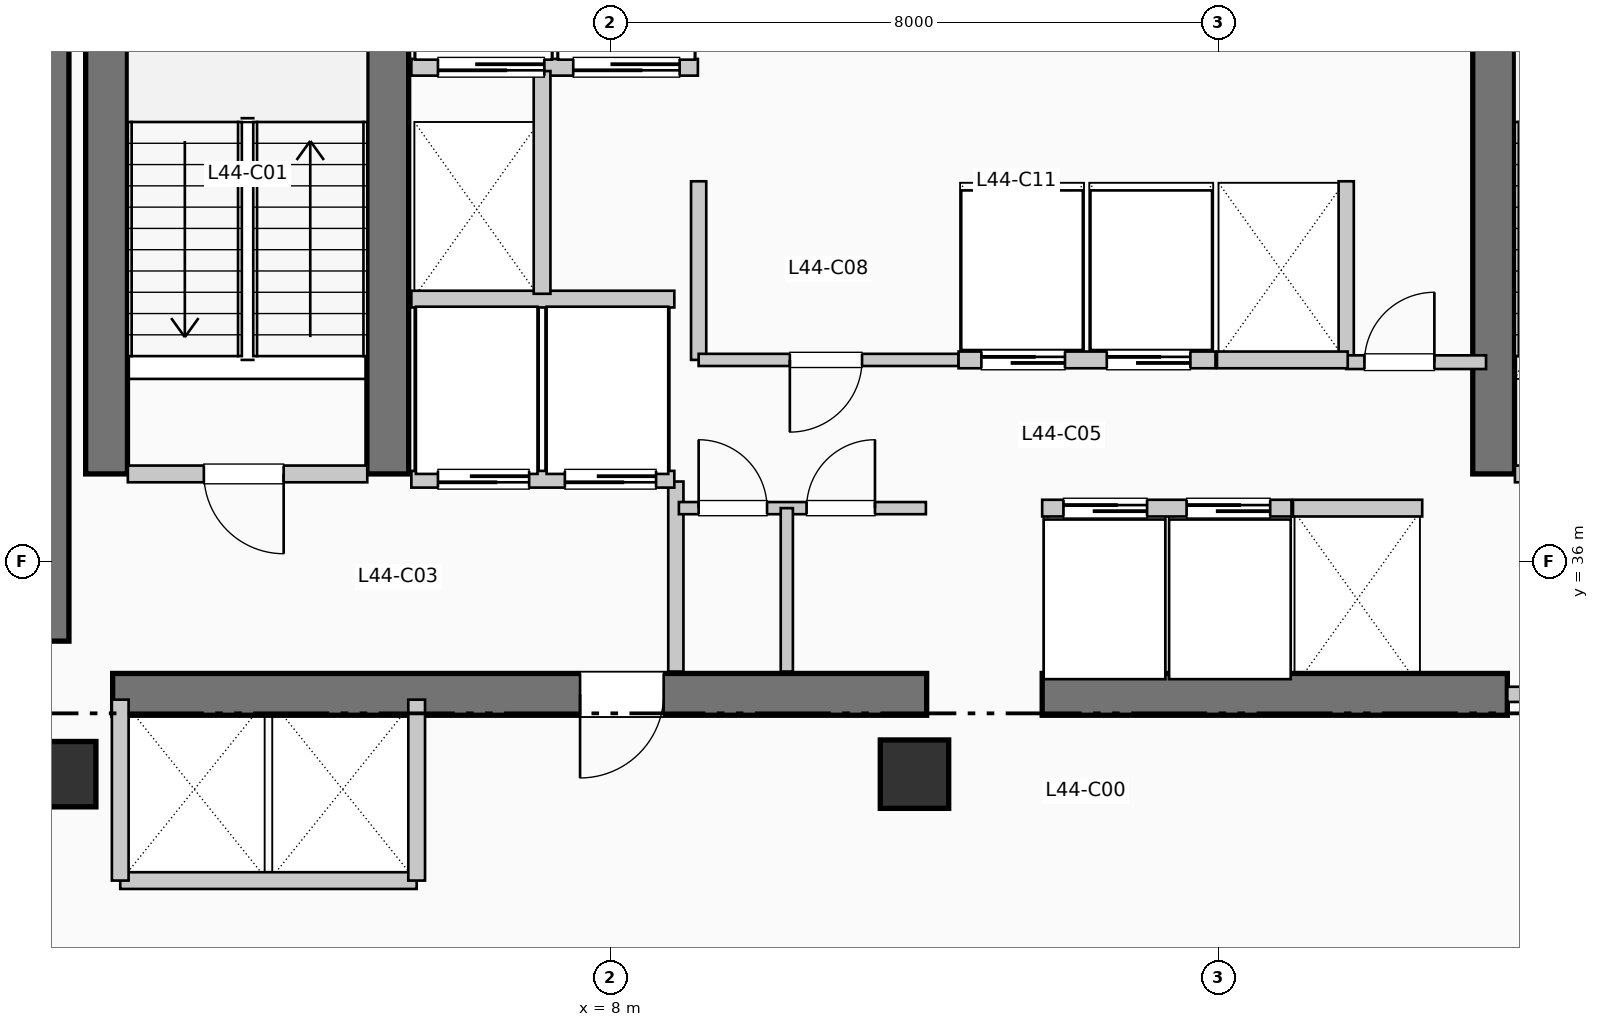
"""IFC4 building model, lengths in metres.
Left out: names, types, materials, properties, quantities, classifications, styles, units other than length and angle.
Written with IfcOpenShell. Run it as: python <this file> out.ifc"""

import sys

from ifc_helpers import new_model, si_unit, direction, frame, frame_2d, origin, origin_2d, place, context, subcontext, project, spatial, rectangle, extrude, element, fill, save


model = new_model("IFC4")
c1 = context("Model", 3, precision=1e-05, world=origin(), true_north=direction((0.0, 1.0)))
c2 = subcontext(c1, "Body", "Model", "MODEL_VIEW")
j1 = project(units=[si_unit("LENGTHUNIT", "METRE"), si_unit("PLANEANGLEUNIT", "RADIAN")], contexts=[c1])
p1 = place(None, origin())
s1 = spatial("IfcSite", under=j1, at=p1, CompositionType="ELEMENT")
p2 = place(p1, origin())
s2 = spatial("IfcBuilding", under=s1, at=p2, CompositionType="ELEMENT")
p3 = place(p2, frame((0.0, 0.0, 183.48)))
s3 = spatial("IfcBuildingStorey", under=s2, at=p3, CompositionType="ELEMENT", Elevation=183.48)
p4 = place(p3, frame((0.5, 34.95, 0.0), z_axis=(0.0, 0.0, 1.0), x_axis=(0.0, 1.0, 0.0)))
e1 = element("IfcWall", 1, at=p4, inside=s3, PredefinedType="SHEAR", context=c2, shape_type="SweptSolid", body=[
    extrude(rectangle(XDim=7.9, YDim=0.75, at=frame_2d((3.95, 0.0))), origin(), (0.0, 0.0, 1.0), 3.96),
])
p5 = place(p3, frame((1.45, 34.25, 0.0), z_axis=(0.0, 0.0, 1.0), x_axis=(1.0, 0.0, 0.0)))
e2 = element("IfcWall", 2, at=p5, inside=s3, PredefinedType="SHEAR", context=c2, shape_type="SweptSolid", body=[
    extrude(rectangle(XDim=10.71, YDim=0.55, at=frame_2d((5.355, 0.0))), origin(), (0.0, 0.0, 1.0), 3.96),
])
p6 = place(p5, frame((7.25, 0.0, 0.0), z_axis=(0.0, 0.0, 1.0), x_axis=(-1.0, 0.0, 0.0)))
e3 = element("IfcOpeningElement", 3, at=p6, cuts=e2, PredefinedType="OPENING", context=c2, shape_type="SweptSolid", body=[
    extrude(rectangle(XDim=1.1, YDim=2.15, at=frame_2d((0.55, 1.075))), frame((0.0, 0.285, 0.0), z_axis=(0.0, -1.0, 0.0), x_axis=(1.0, 0.0, 0.0)), (0.0, 0.0, 1.0), 0.57),
])
p7 = place(p3, frame((13.68, 34.25, 0.0), z_axis=(0.0, 0.0, 1.0), x_axis=(1.0, 0.0, 0.0)))
e4 = element("IfcWall", 4, at=p7, inside=s3, PredefinedType="SHEAR", context=c2, shape_type="SweptSolid", body=[
    extrude(rectangle(XDim=6.12, YDim=0.55, at=frame_2d((3.06, 0.0))), origin(), (0.0, 0.0, 1.0), 3.96),
])
for number, where, z_axis, x_axis in (
    (5, (1.37, 37.15, 0.0), (0.0, 0.0, 1.0), (0.0, 1.0, 0.0)),
    (6, (5.07, 37.15, 0.0), (0.0, 0.0, 1.0), (0.0, 1.0, 0.0)),
    (7, (19.62, 37.15, 0.0), (0.0, 0.0, 1.0), (0.0, 1.0, 0.0)),
):
    element("IfcWall", number, at=place(p3, frame(where, z_axis=z_axis, x_axis=x_axis)), inside=s3, PredefinedType="SHEAR", context=c2, shape_type="SweptSolid", body=[
        extrude(rectangle(XDim=7.89, YDim=0.55, at=frame_2d((3.945, 0.0))), origin(), (0.0, 0.0, 1.0), 3.96),
    ])
p8 = place(p3, frame((0.8, 33.2, 0.0), z_axis=(0.0, 0.0, 1.0), x_axis=(1.0, 0.0, 0.0)))
e8 = element("IfcColumn", 8, at=p8, inside=s3, PredefinedType="COLUMN", context=c2, shape_type="SweptSolid", body=[
    extrude(rectangle(XDim=0.86, YDim=0.86, at=origin_2d()), origin(), (0.0, 0.0, 1.0), 3.96),
])
p9 = place(p3, frame((12.0, 33.2, 0.0), z_axis=(0.0, 0.0, 1.0), x_axis=(1.0, 0.0, 0.0)))
e9 = element("IfcColumn", 9, at=p9, inside=s3, PredefinedType="COLUMN", context=c2, shape_type="SweptSolid", body=[
    extrude(rectangle(XDim=0.9, YDim=0.9, at=origin_2d()), origin(), (0.0, 0.0, 1.0), 3.96),
])
p10 = place(p3, frame((1.65, 37.15, 0.0), z_axis=(0.0, 0.0, 1.0), x_axis=(1.0, 0.0, 0.0)))
e10 = element("IfcWall", 10, at=p10, inside=s3, PredefinedType="PARTITIONING", context=c2, shape_type="SweptSolid", body=[
    extrude(rectangle(XDim=3.15, YDim=0.22, at=frame_2d((1.575, 0.0))), origin(), (0.0, 0.0, 1.0), 3.71),
])
p11 = place(p10, frame((2.05, 0.0, 0.0), z_axis=(0.0, 0.0, 1.0), x_axis=(-1.0, 0.0, 0.0)))
e11 = element("IfcOpeningElement", 11, at=p11, cuts=e10, PredefinedType="OPENING", context=c2, shape_type="SweptSolid", body=[
    extrude(rectangle(XDim=1.05, YDim=2.15, at=frame_2d((0.525, 1.075))), frame((0.0, 0.12, 0.0), z_axis=(0.0, -1.0, 0.0), x_axis=(1.0, 0.0, 0.0)), (0.0, 0.0, 1.0), 0.24),
])
p12 = place(p3, frame((8.86, 34.55, 0.0), z_axis=(0.0, 0.0, 1.0), x_axis=(0.0, 1.0, 0.0)))
e12 = element("IfcWall", 12, at=p12, inside=s3, PredefinedType="PARTITIONING", context=c2, shape_type="SweptSolid", body=[
    extrude(rectangle(XDim=2.5, YDim=0.2, at=frame_2d((1.25, 0.0))), origin(), (0.0, 0.0, 1.0), 3.71),
])
p13 = place(p3, frame((19.9, 37.15, 0.0), z_axis=(0.0, 0.0, 1.0), x_axis=(1.0, 0.0, 0.0)))
e13 = element("IfcWall", 13, at=p13, inside=s3, PredefinedType="PARTITIONING", context=c2, shape_type="SweptSolid", body=[
    extrude(rectangle(XDim=3.15, YDim=0.22, at=frame_2d((1.575, 0.0))), origin(), (0.0, 0.0, 1.0), 3.71),
])
p14 = place(p13, frame((2.05, 0.0, 0.0), z_axis=(0.0, 0.0, 1.0), x_axis=(-1.0, 0.0, 0.0)))
e14 = element("IfcOpeningElement", 14, at=p14, cuts=e13, PredefinedType="OPENING", context=c2, shape_type="SweptSolid", body=[
    extrude(rectangle(XDim=1.05, YDim=2.15, at=frame_2d((0.525, 1.075))), frame((0.0, 0.12, 0.0), z_axis=(0.0, -1.0, 0.0), x_axis=(1.0, 0.0, 0.0)), (0.0, 0.0, 1.0), 0.24),
])
p15 = place(p3, frame((19.8, 34.25, 0.0), z_axis=(0.0, 0.0, 1.0), x_axis=(1.0, 0.0, 0.0)))
e15 = element("IfcWall", 15, at=p15, inside=s3, PredefinedType="PARTITIONING", context=c2, shape_type="SweptSolid", body=[
    extrude(rectangle(XDim=3.25, YDim=0.2, at=frame_2d((1.625, 0.0))), origin(), (0.0, 0.0, 1.0), 3.71),
])
p16 = place(p15, frame((2.15, 0.0, 0.0), z_axis=(0.0, 0.0, 1.0), x_axis=(-1.0, 0.0, 0.0)))
e16 = element("IfcOpeningElement", 16, at=p16, cuts=e15, PredefinedType="OPENING", context=c2, shape_type="SweptSolid", body=[
    extrude(rectangle(XDim=1.1, YDim=2.15, at=frame_2d((0.55, 1.075))), frame((0.0, 0.11, 0.0), z_axis=(0.0, -1.0, 0.0), x_axis=(1.0, 0.0, 0.0)), (0.0, 0.0, 1.0), 0.22),
])
p17 = place(p3, frame((5.38, 37.08, 0.0), z_axis=(0.0, 0.0, 1.0), x_axis=(1.0, 0.0, 0.0)))
e17 = element("IfcWall", 17, at=p17, inside=s3, PredefinedType="PARTITIONING", context=c2, shape_type="SweptSolid", body=[
    extrude(rectangle(XDim=3.46, YDim=0.22, at=frame_2d((1.73, 0.0))), origin(), (0.0, 0.0, 1.0), 3.71),
])
p18 = place(p17, frame((1.55, 0.0, 0.0), z_axis=(0.0, 0.0, 1.0), x_axis=(-1.0, 0.0, 0.0)))
e18 = element("IfcOpeningElement", 18, at=p18, cuts=e17, PredefinedType="OPENING", context=c2, shape_type="SweptSolid", body=[
    extrude(rectangle(XDim=1.2, YDim=2.2, at=frame_2d((0.6, 1.1))), frame((0.0, 0.12, 0.0), z_axis=(0.0, -1.0, 0.0), x_axis=(1.0, 0.0, 0.0)), (0.0, 0.0, 1.0), 0.24),
])
p19 = place(p17, frame((3.22, 0.0, 0.0), z_axis=(0.0, 0.0, 1.0), x_axis=(-1.0, 0.0, 0.0)))
e19 = element("IfcOpeningElement", 19, at=p19, cuts=e17, PredefinedType="OPENING", context=c2, shape_type="SweptSolid", body=[
    extrude(rectangle(XDim=1.2, YDim=2.2, at=frame_2d((0.6, 1.1))), frame((0.0, 0.12, 0.0), z_axis=(0.0, -1.0, 0.0), x_axis=(1.0, 0.0, 0.0)), (0.0, 0.0, 1.0), 0.24),
])
p20 = place(p3, frame((5.38, 39.45, 0.0), z_axis=(0.0, 0.0, 1.0), x_axis=(1.0, 0.0, 0.0)))
e20 = element("IfcWall", 20, at=p20, inside=s3, PredefinedType="PARTITIONING", context=c2, shape_type="SweptSolid", body=[
    extrude(rectangle(XDim=3.46, YDim=0.22, at=frame_2d((1.73, 0.0))), origin(), (0.0, 0.0, 1.0), 3.71),
])
p21 = place(p3, frame((5.38, 42.5, 0.0), z_axis=(0.0, 0.0, 1.0), x_axis=(1.0, 0.0, 0.0)))
e21 = element("IfcWall", 21, at=p21, inside=s3, PredefinedType="PARTITIONING", context=c2, shape_type="SweptSolid", body=[
    extrude(rectangle(XDim=3.77, YDim=0.22, at=frame_2d((1.885, 0.0))), origin(), (0.0, 0.0, 1.0), 3.71),
])
p22 = place(p21, frame((1.75, 0.0, 0.0), z_axis=(0.0, 0.0, 1.0), x_axis=(-1.0, 0.0, 0.0)))
e22 = element("IfcOpeningElement", 22, at=p22, cuts=e21, PredefinedType="OPENING", context=c2, shape_type="SweptSolid", body=[
    extrude(rectangle(XDim=1.4, YDim=2.2, at=frame_2d((0.7, 1.1))), frame((0.0, 0.12, 0.0), z_axis=(0.0, -1.0, 0.0), x_axis=(1.0, 0.0, 0.0)), (0.0, 0.0, 1.0), 0.24),
])
p23 = place(p21, frame((3.53, 0.0, 0.0), z_axis=(0.0, 0.0, 1.0), x_axis=(-1.0, 0.0, 0.0)))
e23 = element("IfcOpeningElement", 23, at=p23, cuts=e21, PredefinedType="OPENING", context=c2, shape_type="SweptSolid", body=[
    extrude(rectangle(XDim=1.4, YDim=2.2, at=frame_2d((0.7, 1.1))), frame((0.0, 0.12, 0.0), z_axis=(0.0, -1.0, 0.0), x_axis=(1.0, 0.0, 0.0)), (0.0, 0.0, 1.0), 0.24),
])
p24 = place(p3, frame((7.1, 39.52, 0.0), z_axis=(0.0, 0.0, 1.0), x_axis=(0.0, 1.0, 0.0)))
e24 = element("IfcWall", 24, at=p24, inside=s3, PredefinedType="PARTITIONING", context=c2, shape_type="SweptSolid", body=[
    extrude(rectangle(XDim=2.93, YDim=0.22, at=frame_2d((1.465, 0.0))), origin(), (0.0, 0.0, 1.0), 3.71),
])
p25 = place(p3, frame((1.55, 31.8, 0.0), z_axis=(0.0, 0.0, 1.0), x_axis=(1.0, 0.0, 0.0)))
e25 = element("IfcWall", 25, at=p25, inside=s3, PredefinedType="PARTITIONING", context=c2, shape_type="SweptSolid", body=[
    extrude(rectangle(XDim=3.9, YDim=0.22, at=frame_2d((1.95, 0.0))), origin(), (0.0, 0.0, 1.0), 3.71),
])
for number, where, z_axis, x_axis in (
    (26, (1.55, 31.8, 0.0), (0.0, 0.0, 1.0), (0.0, 1.0, 0.0)),
    (27, (5.45, 31.8, 0.0), (0.0, 0.0, 1.0), (0.0, 1.0, 0.0)),
):
    element("IfcWall", number, at=place(p3, frame(where, z_axis=z_axis, x_axis=x_axis)), inside=s3, PredefinedType="PARTITIONING", context=c2, shape_type="SweptSolid", body=[
        extrude(rectangle(XDim=2.38, YDim=0.22, at=frame_2d((1.19, 0.0))), origin(), (0.0, 0.0, 1.0), 3.71),
    ])
for number, where, z_axis, x_axis in (
    (28, (9.16, 38.65, 0.0), (0.0, 0.0, 1.0), (0.0, 1.0, 0.0)),
    (29, (17.68, 38.65, 0.0), (0.0, 0.0, 1.0), (0.0, 1.0, 0.0)),
):
    element("IfcWall", number, at=place(p3, frame(where, z_axis=z_axis, x_axis=x_axis)), inside=s3, PredefinedType="PARTITIONING", context=c2, shape_type="SweptSolid", body=[
        extrude(rectangle(XDim=2.35, YDim=0.2, at=frame_2d((1.175, 0.0))), origin(), (0.0, 0.0, 1.0), 3.71),
    ])
p26 = place(p3, frame((17.68, 38.62, 0.0), z_axis=(0.0, 0.0, 1.0), x_axis=(1.0, 0.0, 0.0)))
e30 = element("IfcWall", 30, at=p26, inside=s3, PredefinedType="PARTITIONING", context=c2, shape_type="SweptSolid", body=[
    extrude(rectangle(XDim=1.84, YDim=0.18, at=frame_2d((0.92, 0.0))), origin(), (0.0, 0.0, 1.0), 3.71),
])
p27 = place(p26, frame((0.24, 0.0, 0.0)))
e31 = element("IfcOpeningElement", 31, at=p27, cuts=e30, PredefinedType="OPENING", context=c2, shape_type="SweptSolid", body=[
    extrude(rectangle(XDim=0.92, YDim=2.1, at=frame_2d((0.46, 1.05))), frame((0.0, 0.1, 0.0), z_axis=(0.0, -1.0, 0.0), x_axis=(1.0, 0.0, 0.0)), (0.0, 0.0, 1.0), 0.2),
])
p28 = place(p3, frame((8.9, 36.7, 0.0), z_axis=(0.0, 0.0, 1.0), x_axis=(1.0, 0.0, 0.0)))
e32 = element("IfcWall", 32, at=p28, inside=s3, PredefinedType="PARTITIONING", context=c2, shape_type="SweptSolid", body=[
    extrude(rectangle(XDim=3.25, YDim=0.16, at=frame_2d((1.625, 0.0))), origin(), (0.0, 0.0, 1.0), 3.71),
])
p29 = place(p28, frame((0.26, 0.0, 0.0)))
e33 = element("IfcOpeningElement", 33, at=p29, cuts=e32, PredefinedType="OPENING", context=c2, shape_type="SweptSolid", body=[
    extrude(rectangle(XDim=0.9, YDim=2.15, at=frame_2d((0.45, 1.075))), frame((0.0, 0.09, 0.0), z_axis=(0.0, -1.0, 0.0), x_axis=(1.0, 0.0, 0.0)), (0.0, 0.0, 1.0), 0.18),
])
p30 = place(p28, frame((1.68, 0.0, 0.0)))
e34 = element("IfcOpeningElement", 34, at=p30, cuts=e32, PredefinedType="OPENING", context=c2, shape_type="SweptSolid", body=[
    extrude(rectangle(XDim=0.9, YDim=2.15, at=frame_2d((0.45, 1.075))), frame((0.0, 0.09, 0.0), z_axis=(0.0, -1.0, 0.0), x_axis=(1.0, 0.0, 0.0)), (0.0, 0.0, 1.0), 0.18),
])
p31 = place(p3, frame((10.32, 34.55, 0.0), z_axis=(0.0, 0.0, 1.0), x_axis=(0.0, 1.0, 0.0)))
e35 = element("IfcWall", 35, at=p31, inside=s3, PredefinedType="PARTITIONING", context=c2, shape_type="SweptSolid", body=[
    extrude(rectangle(XDim=2.15, YDim=0.16, at=frame_2d((1.075, 0.0))), origin(), (0.0, 0.0, 1.0), 3.71),
])
p32 = place(p3, frame((9.16, 38.65, 0.0), z_axis=(0.0, 0.0, 1.0), x_axis=(1.0, 0.0, 0.0)))
e36 = element("IfcWall", 36, at=p32, inside=s3, PredefinedType="PARTITIONING", context=c2, shape_type="SweptSolid", body=[
    extrude(rectangle(XDim=3.42, YDim=0.16, at=frame_2d((1.71, 0.0))), origin(), (0.0, 0.0, 1.0), 3.71),
])
p33 = place(p32, frame((2.15, 0.0, 0.0), z_axis=(0.0, 0.0, 1.0), x_axis=(-1.0, 0.0, 0.0)))
e37 = element("IfcOpeningElement", 37, at=p33, cuts=e36, PredefinedType="OPENING", context=c2, shape_type="SweptSolid", body=[
    extrude(rectangle(XDim=0.95, YDim=2.15, at=frame_2d((0.475, 1.075))), frame((0.0, 0.09, 0.0), z_axis=(0.0, -1.0, 0.0), x_axis=(1.0, 0.0, 0.0)), (0.0, 0.0, 1.0), 0.18),
])
p34 = place(p3, frame((13.68, 36.7, 0.0), z_axis=(0.0, 0.0, 1.0), x_axis=(1.0, 0.0, 0.0)))
e38 = element("IfcWall", 38, at=p34, inside=s3, PredefinedType="PARTITIONING", context=c2, shape_type="SweptSolid", body=[
    extrude(rectangle(XDim=3.28, YDim=0.22, at=frame_2d((1.64, 0.0))), origin(), (0.0, 0.0, 1.0), 3.71),
])
p35 = place(p34, frame((0.28, 0.0, 0.0)))
e39 = element("IfcOpeningElement", 39, at=p35, cuts=e38, PredefinedType="OPENING", context=c2, shape_type="SweptSolid", body=[
    extrude(rectangle(XDim=1.1, YDim=2.2, at=frame_2d((0.55, 1.1))), frame((0.0, 0.12, 0.0), z_axis=(0.0, -1.0, 0.0), x_axis=(1.0, 0.0, 0.0)), (0.0, 0.0, 1.0), 0.24),
])
p36 = place(p34, frame((1.9, 0.0, 0.0)))
e40 = element("IfcOpeningElement", 40, at=p36, cuts=e38, PredefinedType="OPENING", context=c2, shape_type="SweptSolid", body=[
    extrude(rectangle(XDim=1.1, YDim=2.2, at=frame_2d((0.55, 1.1))), frame((0.0, 0.12, 0.0), z_axis=(0.0, -1.0, 0.0), x_axis=(1.0, 0.0, 0.0)), (0.0, 0.0, 1.0), 0.24),
])
p37 = place(p3, frame((12.58, 38.65, 0.0), z_axis=(0.0, 0.0, 1.0), x_axis=(1.0, 0.0, 0.0)))
e41 = element("IfcWall", 41, at=p37, inside=s3, PredefinedType="PARTITIONING", context=c2, shape_type="SweptSolid", body=[
    extrude(rectangle(XDim=3.38, YDim=0.22, at=frame_2d((1.69, 0.0))), origin(), (0.0, 0.0, 1.0), 3.71),
])
p38 = place(p37, frame((0.3, 0.0, 0.0)))
e42 = element("IfcOpeningElement", 42, at=p38, cuts=e41, PredefinedType="OPENING", context=c2, shape_type="SweptSolid", body=[
    extrude(rectangle(XDim=1.1, YDim=2.2, at=frame_2d((0.55, 1.1))), frame((0.0, 0.12, 0.0), z_axis=(0.0, -1.0, 0.0), x_axis=(1.0, 0.0, 0.0)), (0.0, 0.0, 1.0), 0.24),
])
p39 = place(p37, frame((1.95, 0.0, 0.0)))
e43 = element("IfcOpeningElement", 43, at=p39, cuts=e41, PredefinedType="OPENING", context=c2, shape_type="SweptSolid", body=[
    extrude(rectangle(XDim=1.1, YDim=2.2, at=frame_2d((0.55, 1.1))), frame((0.0, 0.12, 0.0), z_axis=(0.0, -1.0, 0.0), x_axis=(1.0, 0.0, 0.0)), (0.0, 0.0, 1.0), 0.24),
])
p40 = place(p3, frame((16.98, 36.7, 0.0), z_axis=(0.0, 0.0, 1.0), x_axis=(1.0, 0.0, 0.0)))
e44 = element("IfcWall", 44, at=p40, inside=s3, PredefinedType="PARTITIONING", context=c2, shape_type="SweptSolid", body=[
    extrude(rectangle(XDim=1.7, YDim=0.22, at=frame_2d((0.85, 0.0))), origin(), (0.0, 0.0, 1.0), 3.71),
])
p41 = place(p3, frame((15.98, 38.65, 0.0), z_axis=(0.0, 0.0, 1.0), x_axis=(1.0, 0.0, 0.0)))
e45 = element("IfcWall", 45, at=p41, inside=s3, PredefinedType="PARTITIONING", context=c2, shape_type="SweptSolid", body=[
    extrude(rectangle(XDim=1.72, YDim=0.22, at=frame_2d((0.86, 0.0))), origin(), (0.0, 0.0, 1.0), 3.71),
])
p42 = place(p11, origin())
e46 = element("IfcDoor", 46, at=p42, inside=s3, OperationType="SINGLE_SWING_RIGHT", PredefinedType="DOOR", context=c2, shape_type="SweptSolid", body=[
    extrude(rectangle(XDim=1.05, YDim=2.15, at=frame_2d((0.525, 1.075))), frame((0.0, 0.025, 0.0), z_axis=(0.0, -1.0, 0.0), x_axis=(1.0, 0.0, 0.0)), (0.0, 0.0, 1.0), 0.05),
])
fill(e11, e46)
p43 = place(p6, origin())
e47 = element("IfcDoor", 47, at=p43, inside=s3, OperationType="SINGLE_SWING_LEFT", PredefinedType="DOOR", context=c2, shape_type="SweptSolid", body=[
    extrude(rectangle(XDim=1.1, YDim=2.15, at=frame_2d((0.55, 1.075))), frame((0.0, 0.025, 0.0), z_axis=(0.0, -1.0, 0.0), x_axis=(1.0, 0.0, 0.0)), (0.0, 0.0, 1.0), 0.05),
])
fill(e3, e47)
p44 = place(p18, origin())
e48 = element("IfcDoor", 48, at=p44, inside=s3, OperationType="SLIDING_TO_RIGHT", PredefinedType="DOOR", context=c2, shape_type="SweptSolid", body=[
    extrude(rectangle(XDim=1.2, YDim=2.2, at=frame_2d((0.6, 1.1))), frame((0.0, 0.025, 0.0), z_axis=(0.0, -1.0, 0.0), x_axis=(1.0, 0.0, 0.0)), (0.0, 0.0, 1.0), 0.05),
])
fill(e18, e48)
p45 = place(p19, origin())
e49 = element("IfcDoor", 49, at=p45, inside=s3, OperationType="SLIDING_TO_RIGHT", PredefinedType="DOOR", context=c2, shape_type="SweptSolid", body=[
    extrude(rectangle(XDim=1.2, YDim=2.2, at=frame_2d((0.6, 1.1))), frame((0.0, 0.025, 0.0), z_axis=(0.0, -1.0, 0.0), x_axis=(1.0, 0.0, 0.0)), (0.0, 0.0, 1.0), 0.05),
])
fill(e19, e49)
p46 = place(p22, origin())
e50 = element("IfcDoor", 50, at=p46, inside=s3, OperationType="SLIDING_TO_LEFT", PredefinedType="DOOR", context=c2, shape_type="SweptSolid", body=[
    extrude(rectangle(XDim=1.4, YDim=2.2, at=frame_2d((0.7, 1.1))), frame((0.0, 0.025, 0.0), z_axis=(0.0, -1.0, 0.0), x_axis=(1.0, 0.0, 0.0)), (0.0, 0.0, 1.0), 0.05),
])
fill(e22, e50)
p47 = place(p23, origin())
e51 = element("IfcDoor", 51, at=p47, inside=s3, OperationType="SLIDING_TO_LEFT", PredefinedType="DOOR", context=c2, shape_type="SweptSolid", body=[
    extrude(rectangle(XDim=1.4, YDim=2.2, at=frame_2d((0.7, 1.1))), frame((0.0, 0.025, 0.0), z_axis=(0.0, -1.0, 0.0), x_axis=(1.0, 0.0, 0.0)), (0.0, 0.0, 1.0), 0.05),
])
fill(e23, e51)
p48 = place(p27, origin())
e52 = element("IfcDoor", 52, at=p48, inside=s3, OperationType="SINGLE_SWING_RIGHT", PredefinedType="DOOR", context=c2, shape_type="SweptSolid", body=[
    extrude(rectangle(XDim=0.92, YDim=2.1, at=frame_2d((0.46, 1.05))), frame((0.0, 0.025, 0.0), z_axis=(0.0, -1.0, 0.0), x_axis=(1.0, 0.0, 0.0)), (0.0, 0.0, 1.0), 0.05),
])
fill(e31, e52)
p49 = place(p29, origin())
e53 = element("IfcDoor", 53, at=p49, inside=s3, OperationType="SINGLE_SWING_LEFT", PredefinedType="DOOR", context=c2, shape_type="SweptSolid", body=[
    extrude(rectangle(XDim=0.9, YDim=2.15, at=frame_2d((0.45, 1.075))), frame((0.0, 0.025, 0.0), z_axis=(0.0, -1.0, 0.0), x_axis=(1.0, 0.0, 0.0)), (0.0, 0.0, 1.0), 0.05),
])
fill(e33, e53)
p50 = place(p30, origin())
e54 = element("IfcDoor", 54, at=p50, inside=s3, OperationType="SINGLE_SWING_RIGHT", PredefinedType="DOOR", context=c2, shape_type="SweptSolid", body=[
    extrude(rectangle(XDim=0.9, YDim=2.15, at=frame_2d((0.45, 1.075))), frame((0.0, 0.025, 0.0), z_axis=(0.0, -1.0, 0.0), x_axis=(1.0, 0.0, 0.0)), (0.0, 0.0, 1.0), 0.05),
])
fill(e34, e54)
p51 = place(p33, origin())
e55 = element("IfcDoor", 55, at=p51, inside=s3, OperationType="SINGLE_SWING_LEFT", PredefinedType="DOOR", context=c2, shape_type="SweptSolid", body=[
    extrude(rectangle(XDim=0.95, YDim=2.15, at=frame_2d((0.475, 1.075))), frame((0.0, 0.025, 0.0), z_axis=(0.0, -1.0, 0.0), x_axis=(1.0, 0.0, 0.0)), (0.0, 0.0, 1.0), 0.05),
])
fill(e37, e55)
p52 = place(p35, origin())
e56 = element("IfcDoor", 56, at=p52, inside=s3, OperationType="SLIDING_TO_RIGHT", PredefinedType="DOOR", context=c2, shape_type="SweptSolid", body=[
    extrude(rectangle(XDim=1.1, YDim=2.2, at=frame_2d((0.55, 1.1))), frame((0.0, 0.025, 0.0), z_axis=(0.0, -1.0, 0.0), x_axis=(1.0, 0.0, 0.0)), (0.0, 0.0, 1.0), 0.05),
])
fill(e39, e56)
p53 = place(p36, origin())
e57 = element("IfcDoor", 57, at=p53, inside=s3, OperationType="SLIDING_TO_RIGHT", PredefinedType="DOOR", context=c2, shape_type="SweptSolid", body=[
    extrude(rectangle(XDim=1.1, YDim=2.2, at=frame_2d((0.55, 1.1))), frame((0.0, 0.025, 0.0), z_axis=(0.0, -1.0, 0.0), x_axis=(1.0, 0.0, 0.0)), (0.0, 0.0, 1.0), 0.05),
])
fill(e40, e57)
p54 = place(p38, origin())
e58 = element("IfcDoor", 58, at=p54, inside=s3, OperationType="SLIDING_TO_RIGHT", PredefinedType="DOOR", context=c2, shape_type="SweptSolid", body=[
    extrude(rectangle(XDim=1.1, YDim=2.2, at=frame_2d((0.55, 1.1))), frame((0.0, 0.025, 0.0), z_axis=(0.0, -1.0, 0.0), x_axis=(1.0, 0.0, 0.0)), (0.0, 0.0, 1.0), 0.05),
])
fill(e42, e58)
p55 = place(p39, origin())
e59 = element("IfcDoor", 59, at=p55, inside=s3, OperationType="SLIDING_TO_RIGHT", PredefinedType="DOOR", context=c2, shape_type="SweptSolid", body=[
    extrude(rectangle(XDim=1.1, YDim=2.2, at=frame_2d((0.55, 1.1))), frame((0.0, 0.025, 0.0), z_axis=(0.0, -1.0, 0.0), x_axis=(1.0, 0.0, 0.0)), (0.0, 0.0, 1.0), 0.05),
])
fill(e43, e59)
save(model, sys.argv[1])
